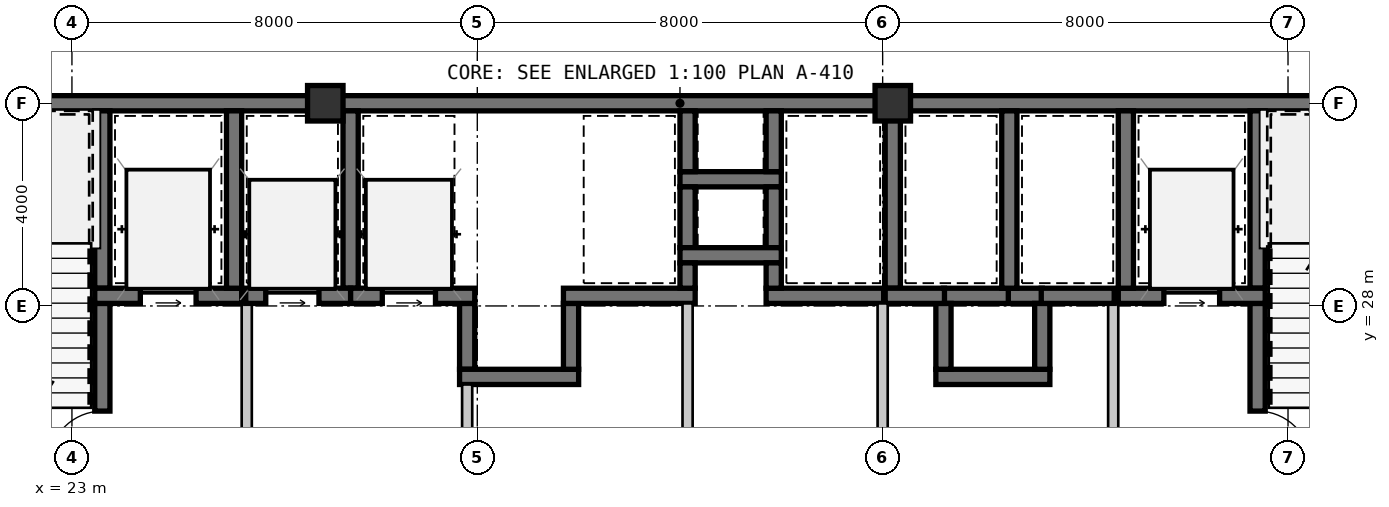
"""IFC4 building model, lengths in metres.
Left out: names, types, materials, properties, quantities, classifications, styles, units other than length and angle.
Written with IfcOpenShell. Run it as: python <this file> out.ifc"""

import sys

from ifc_helpers import new_model, si_unit, direction, frame, frame_2d, origin, origin_2d, place, context, subcontext, project, spatial, rectangle, extrude, source, transform, mapped, element, fill, save


model = new_model("IFC4")
c1 = context("Model", 3, precision=1e-05, world=origin(), true_north=direction((0.0, 1.0)))
c2 = subcontext(c1, "Body", "Model", "MODEL_VIEW")
j1 = project(units=[si_unit("LENGTHUNIT", "METRE"), si_unit("PLANEANGLEUNIT", "RADIAN")], contexts=[c1])
p1 = place(None, origin())
s1 = spatial("IfcSite", under=j1, at=p1, CompositionType="ELEMENT")
p2 = place(p1, origin())
s2 = spatial("IfcBuilding", under=s1, at=p2, CompositionType="ELEMENT")
p3 = place(p2, frame((0.0, 0.0, 93.45)))
s3 = spatial("IfcBuildingStorey", under=s2, at=p3, CompositionType="ELEMENT", Elevation=93.45)
m1 = source(origin(), c2, "Body", "SweptSolid", [
    extrude(rectangle(XDim=0.7, YDim=0.7, at=origin_2d()), origin(), (0.0, 0.0, 1.0), 3.15),
])
for number, where, z_axis, x_axis in (
    (1, (28.0, 32.0, 0.0), (0.0, 0.0, 1.0), (1.0, 0.0, 0.0)),
    (2, (39.2, 32.0, 0.0), (0.0, 0.0, 1.0), (1.0, 0.0, 0.0)),
):
    element("IfcColumn", number, at=place(p3, frame(where, z_axis=z_axis, x_axis=x_axis)), inside=s3, PredefinedType="COLUMN", context=c2, shape_type="MappedRepresentation", body=[
        mapped(m1, transform((0.0, 0.0, 0.0), scale=1.0)),
    ])
m2 = source(origin(), c2, "Body", "SweptSolid", [
    extrude(rectangle(XDim=9.15, YDim=0.3, at=frame_2d((4.575, 0.0))), origin(), (0.0, 0.0, 1.0), 2.93),
])
p4 = place(p3, frame((18.85, 32.0, 0.0), z_axis=(0.0, 0.0, 1.0), x_axis=(1.0, 0.0, 0.0)))
e3 = element("IfcWall", 3, at=p4, inside=s3, PredefinedType="SHEAR", context=c2, shape_type="MappedRepresentation", body=[
    mapped(m2, transform((0.0, 0.0, 0.0), scale=1.0)),
])
m3 = source(origin(), c2, "Body", "SweptSolid", [
    extrude(rectangle(XDim=11.2, YDim=0.3, at=frame_2d((5.6, 0.0))), origin(), (0.0, 0.0, 1.0), 2.93),
])
p5 = place(p3, frame((28.0, 32.0, 0.0), z_axis=(0.0, 0.0, 1.0), x_axis=(1.0, 0.0, 0.0)))
e4 = element("IfcWall", 4, at=p5, inside=s3, PredefinedType="SHEAR", context=c2, shape_type="MappedRepresentation", body=[
    mapped(m3, transform((0.0, 0.0, 0.0), scale=1.0)),
])
m4 = source(origin(), c2, "Body", "SweptSolid", [
    extrude(rectangle(XDim=11.95, YDim=0.3, at=frame_2d((5.975, 0.0))), origin(), (0.0, 0.0, 1.0), 2.93),
])
p6 = place(p3, frame((39.2, 32.0, 0.0), z_axis=(0.0, 0.0, 1.0), x_axis=(1.0, 0.0, 0.0)))
e5 = element("IfcWall", 5, at=p6, inside=s3, PredefinedType="SHEAR", context=c2, shape_type="MappedRepresentation", body=[
    mapped(m4, transform((0.0, 0.0, 0.0), scale=1.0)),
])
m5 = source(origin(), c2, "Body", "SweptSolid", [
    extrude(rectangle(XDim=3.5, YDim=0.3, at=frame_2d((1.75, 0.0))), origin(), (0.0, 0.0, 1.0), 2.93),
])
p7 = place(p3, frame((23.6, 28.35, 0.0), z_axis=(0.0, 0.0, 1.0), x_axis=(0.0, 1.0, 0.0)))
e6 = element("IfcWall", 6, at=p7, inside=s3, PredefinedType="SHEAR", context=c2, shape_type="MappedRepresentation", body=[
    mapped(m5, transform((0.0, 0.0, 0.0), scale=1.0)),
])
m6 = source(origin(), c2, "Body", "SweptSolid", [
    extrude(rectangle(XDim=3.9, YDim=0.3, at=frame_2d((1.95, 0.0))), origin(), (0.0, 0.0, 1.0), 2.93),
])
p8 = place(p3, frame((23.6, 24.15, 0.0), z_axis=(0.0, 0.0, 1.0), x_axis=(0.0, 1.0, 0.0)))
e7 = element("IfcWall", 7, at=p8, inside=s3, PredefinedType="SHEAR", context=c2, shape_type="MappedRepresentation", body=[
    mapped(m6, transform((0.0, 0.0, 0.0), scale=1.0)),
])
m7 = source(origin(), c2, "Body", "SweptSolid", [
    extrude(rectangle(XDim=1.05, YDim=2.1, at=frame_2d((0.525, 1.05))), frame((0.0, 0.16, 0.0), z_axis=(0.0, -1.0, 0.0), x_axis=(1.0, 0.0, 0.0)), (0.0, 0.0, 1.0), 0.32),
])
p9 = place(p8, frame((0.725, 0.0, 0.0)))
e8 = element("IfcOpeningElement", 8, at=p9, cuts=e7, PredefinedType="OPENING", context=c2, shape_type="MappedRepresentation", body=[
    mapped(m7, transform((0.0, 0.0, 0.0), scale=1.0)),
])
m8 = source(origin(), c2, "Body", "SweptSolid", [
    extrude(rectangle(XDim=2.9, YDim=0.3, at=frame_2d((1.45, 0.0))), origin(), (0.0, 0.0, 1.0), 2.93),
])
p10 = place(p3, frame((23.45, 28.2, 0.0), z_axis=(0.0, 0.0, 1.0), x_axis=(1.0, 0.0, 0.0)))
e9 = element("IfcWall", 9, at=p10, inside=s3, PredefinedType="SHEAR", context=c2, shape_type="MappedRepresentation", body=[
    mapped(m8, transform((0.0, 0.0, 0.0), scale=1.0)),
])
m9 = source(origin(), c2, "Body", "SweptSolid", [
    extrude(rectangle(XDim=1.1, YDim=2.15, at=frame_2d((0.55, 1.075))), frame((0.0, 0.16, 0.0), z_axis=(0.0, -1.0, 0.0), x_axis=(1.0, 0.0, 0.0)), (0.0, 0.0, 1.0), 0.32),
])
p11 = place(p10, frame((0.9, 0.0, 0.0)))
e10 = element("IfcOpeningElement", 10, at=p11, cuts=e9, PredefinedType="OPENING", context=c2, shape_type="MappedRepresentation", body=[
    mapped(m9, transform((0.0, 0.0, 0.0), scale=1.0)),
])
p12 = place(p3, frame((26.2, 28.35, 0.0), z_axis=(0.0, 0.0, 1.0), x_axis=(0.0, 1.0, 0.0)))
e11 = element("IfcWall", 11, at=p12, inside=s3, PredefinedType="SHEAR", context=c2, shape_type="MappedRepresentation", body=[
    mapped(m5, transform((0.0, 0.0, 0.0), scale=1.0)),
])
m10 = source(origin(), c2, "Body", "SweptSolid", [
    extrude(rectangle(XDim=3.95, YDim=0.2, at=frame_2d((1.975, 0.0))), origin(), (0.0, 0.0, 1.0), 2.93),
])
p13 = place(p3, frame((26.45, 24.1, 0.0), z_axis=(0.0, 0.0, 1.0), x_axis=(0.0, 1.0, 0.0)))
e12 = element("IfcWall", 12, at=p13, inside=s3, PredefinedType="SOLIDWALL", context=c2, shape_type="MappedRepresentation", body=[
    mapped(m10, transform((0.0, 0.0, 0.0), scale=1.0)),
])
p14 = place(p3, frame((46.4, 31.85, 0.0), z_axis=(0.0, 0.0, 1.0), x_axis=(0.0, -1.0, 0.0)))
e13 = element("IfcWall", 13, at=p14, inside=s3, PredefinedType="SHEAR", context=c2, shape_type="MappedRepresentation", body=[
    mapped(m5, transform((0.0, 0.0, 0.0), scale=1.0)),
])
p15 = place(p3, frame((46.4, 28.05, 0.0), z_axis=(0.0, 0.0, 1.0), x_axis=(0.0, -1.0, 0.0)))
e14 = element("IfcWall", 14, at=p15, inside=s3, PredefinedType="SHEAR", context=c2, shape_type="MappedRepresentation", body=[
    mapped(m6, transform((0.0, 0.0, 0.0), scale=1.0)),
])
p16 = place(p15, frame((2.125, 0.0, 0.0)))
e15 = element("IfcOpeningElement", 15, at=p16, cuts=e14, PredefinedType="OPENING", context=c2, shape_type="MappedRepresentation", body=[
    mapped(m7, transform((0.0, 0.0, 0.0), scale=1.0)),
])
p17 = place(p3, frame((43.65, 28.2, 0.0), z_axis=(0.0, 0.0, 1.0), x_axis=(1.0, 0.0, 0.0)))
e16 = element("IfcWall", 16, at=p17, inside=s3, PredefinedType="SHEAR", context=c2, shape_type="MappedRepresentation", body=[
    mapped(m8, transform((0.0, 0.0, 0.0), scale=1.0)),
])
p18 = place(p17, frame((0.9, 0.0, 0.0)))
e17 = element("IfcOpeningElement", 17, at=p18, cuts=e16, PredefinedType="OPENING", context=c2, shape_type="MappedRepresentation", body=[
    mapped(m9, transform((0.0, 0.0, 0.0), scale=1.0)),
])
p19 = place(p3, frame((43.8, 31.85, 0.0), z_axis=(0.0, 0.0, 1.0), x_axis=(0.0, -1.0, 0.0)))
e18 = element("IfcWall", 18, at=p19, inside=s3, PredefinedType="SHEAR", context=c2, shape_type="MappedRepresentation", body=[
    mapped(m5, transform((0.0, 0.0, 0.0), scale=1.0)),
])
p20 = place(p3, frame((43.55, 28.05, 0.0), z_axis=(0.0, 0.0, 1.0), x_axis=(0.0, -1.0, 0.0)))
e19 = element("IfcWall", 19, at=p20, inside=s3, PredefinedType="SOLIDWALL", context=c2, shape_type="MappedRepresentation", body=[
    mapped(m10, transform((0.0, 0.0, 0.0), scale=1.0)),
])
m11 = source(origin(), c2, "Body", "SweptSolid", [
    extrude(rectangle(XDim=2.0, YDim=0.3, at=frame_2d((1.0, 0.0))), origin(), (0.0, 0.0, 1.0), 2.93),
])
p21 = place(p3, frame((35.0, 30.5, 0.0), z_axis=(0.0, 0.0, 1.0), x_axis=(1.0, 0.0, 0.0)))
e20 = element("IfcWall", 20, at=p21, inside=s3, PredefinedType="SHEAR", context=c2, shape_type="MappedRepresentation", body=[
    mapped(m11, transform((0.0, 0.0, 0.0), scale=1.0)),
])
m12 = source(origin(), c2, "Body", "SweptSolid", [
    extrude(rectangle(XDim=1.2, YDim=0.3, at=frame_2d((0.6, 0.0))), origin(), (0.0, 0.0, 1.0), 2.93),
])
for number, where, z_axis, x_axis in (
    (21, (35.15, 31.85, 0.0), (0.0, 0.0, 1.0), (0.0, -1.0, 0.0)),
    (22, (36.85, 30.65, 0.0), (0.0, 0.0, 1.0), (0.0, 1.0, 0.0)),
    (23, (35.15, 30.35, 0.0), (0.0, 0.0, 1.0), (0.0, -1.0, 0.0)),
    (24, (36.85, 29.15, 0.0), (0.0, 0.0, 1.0), (0.0, 1.0, 0.0)),
):
    element("IfcWall", number, at=place(p3, frame(where, z_axis=z_axis, x_axis=x_axis)), inside=s3, PredefinedType="SHEAR", context=c2, shape_type="MappedRepresentation", body=[
        mapped(m12, transform((0.0, 0.0, 0.0), scale=1.0)),
    ])
p22 = place(p3, frame((35.0, 29.0, 0.0), z_axis=(0.0, 0.0, 1.0), x_axis=(1.0, 0.0, 0.0)))
e25 = element("IfcWall", 25, at=p22, inside=s3, PredefinedType="SHEAR", context=c2, shape_type="MappedRepresentation", body=[
    mapped(m11, transform((0.0, 0.0, 0.0), scale=1.0)),
])
m13 = source(origin(), c2, "Body", "SweptSolid", [
    extrude(rectangle(XDim=1.3, YDim=0.3, at=frame_2d((0.65, 0.0))), origin(), (0.0, 0.0, 1.0), 2.93),
])
p23 = place(p3, frame((30.8, 28.05, 0.0), z_axis=(0.0, 0.0, 1.0), x_axis=(0.0, -1.0, 0.0)))
e26 = element("IfcWall", 26, at=p23, inside=s3, PredefinedType="SHEAR", context=c2, shape_type="MappedRepresentation", body=[
    mapped(m13, transform((0.0, 0.0, 0.0), scale=1.0)),
])
m14 = source(origin(), c2, "Body", "SweptSolid", [
    extrude(rectangle(XDim=2.35, YDim=0.3, at=frame_2d((1.175, 0.0))), origin(), (0.0, 0.0, 1.0), 2.93),
])
p24 = place(p3, frame((30.65, 26.6, 0.0), z_axis=(0.0, 0.0, 1.0), x_axis=(1.0, 0.0, 0.0)))
e27 = element("IfcWall", 27, at=p24, inside=s3, PredefinedType="SHEAR", context=c2, shape_type="MappedRepresentation", body=[
    mapped(m14, transform((0.0, 0.0, 0.0), scale=1.0)),
])
p25 = place(p3, frame((32.85, 26.75, 0.0), z_axis=(0.0, 0.0, 1.0), x_axis=(0.0, 1.0, 0.0)))
e28 = element("IfcWall", 28, at=p25, inside=s3, PredefinedType="SHEAR", context=c2, shape_type="MappedRepresentation", body=[
    mapped(m13, transform((0.0, 0.0, 0.0), scale=1.0)),
])
m15 = source(origin(), c2, "Body", "SweptSolid", [
    extrude(rectangle(XDim=1.32, YDim=0.3, at=frame_2d((0.66, 0.0))), origin(), (0.0, 0.0, 1.0), 2.93),
])
p26 = place(p3, frame((41.52, 28.2, 0.0), z_axis=(0.0, 0.0, 1.0), x_axis=(-1.0, 0.0, 0.0)))
e29 = element("IfcWall", 29, at=p26, inside=s3, PredefinedType="SHEAR", context=c2, shape_type="MappedRepresentation", body=[
    mapped(m15, transform((0.0, 0.0, 0.0), scale=1.0)),
])
m16 = source(origin(), c2, "Body", "SweptSolid", [
    extrude(rectangle(XDim=0.67, YDim=0.3, at=frame_2d((0.335, 0.0))), origin(), (0.0, 0.0, 1.0), 2.93),
])
p27 = place(p3, frame((42.15, 28.2, 0.0), z_axis=(0.0, 0.0, 1.0), x_axis=(-1.0, 0.0, 0.0)))
e30 = element("IfcWall", 30, at=p27, inside=s3, PredefinedType="SHEAR", context=c2, shape_type="MappedRepresentation", body=[
    mapped(m16, transform((0.0, 0.0, 0.0), scale=1.0)),
])
m17 = source(origin(), c2, "Body", "SweptSolid", [
    extrude(rectangle(XDim=2.25, YDim=0.3, at=frame_2d((1.125, 0.0))), origin(), (0.0, 0.0, 1.0), 2.93),
])
p28 = place(p3, frame((40.05, 26.6, 0.0), z_axis=(0.0, 0.0, 1.0), x_axis=(1.0, 0.0, 0.0)))
e31 = element("IfcWall", 31, at=p28, inside=s3, PredefinedType="SHEAR", context=c2, shape_type="MappedRepresentation", body=[
    mapped(m17, transform((0.0, 0.0, 0.0), scale=1.0)),
])
for number, where, z_axis, x_axis in (
    (32, (40.2, 28.05, 0.0), (0.0, 0.0, 1.0), (0.0, -1.0, 0.0)),
    (33, (42.15, 26.75, 0.0), (0.0, 0.0, 1.0), (0.0, 1.0, 0.0)),
):
    element("IfcWall", number, at=place(p3, frame(where, z_axis=z_axis, x_axis=x_axis)), inside=s3, PredefinedType="SHEAR", context=c2, shape_type="MappedRepresentation", body=[
        mapped(m13, transform((0.0, 0.0, 0.0), scale=1.0)),
    ])
p29 = place(p3, frame((28.5, 28.35, 0.0), z_axis=(0.0, 0.0, 1.0), x_axis=(0.0, 1.0, 0.0)))
e34 = element("IfcWall", 34, at=p29, inside=s3, PredefinedType="SHEAR", context=c2, shape_type="MappedRepresentation", body=[
    mapped(m5, transform((0.0, 0.0, 0.0), scale=1.0)),
])
m18 = source(origin(), c2, "Body", "SweptSolid", [
    extrude(rectangle(XDim=2.07, YDim=0.3, at=frame_2d((1.035, 0.0))), origin(), (0.0, 0.0, 1.0), 2.93),
])
p30 = place(p3, frame((26.43, 28.2, 0.0), z_axis=(0.0, 0.0, 1.0), x_axis=(1.0, 0.0, 0.0)))
e35 = element("IfcWall", 35, at=p30, inside=s3, PredefinedType="SHEAR", context=c2, shape_type="MappedRepresentation", body=[
    mapped(m18, transform((0.0, 0.0, 0.0), scale=1.0)),
])
m19 = source(origin(), c2, "Body", "SweptSolid", [
    extrude(rectangle(XDim=1.05, YDim=2.15, at=frame_2d((0.525, 1.075))), frame((0.0, 0.16, 0.0), z_axis=(0.0, -1.0, 0.0), x_axis=(1.0, 0.0, 0.0)), (0.0, 0.0, 1.0), 0.32),
])
p31 = place(p30, frame((0.395, 0.0, 0.0)))
e36 = element("IfcOpeningElement", 36, at=p31, cuts=e35, PredefinedType="OPENING", context=c2, shape_type="MappedRepresentation", body=[
    mapped(m19, transform((0.0, 0.0, 0.0), scale=1.0)),
])
m20 = source(origin(), c2, "Body", "SweptSolid", [
    extrude(rectangle(XDim=2.45, YDim=0.3, at=frame_2d((1.225, 0.0))), origin(), (0.0, 0.0, 1.0), 2.93),
])
p32 = place(p3, frame((28.5, 28.2, 0.0), z_axis=(0.0, 0.0, 1.0), x_axis=(1.0, 0.0, 0.0)))
e37 = element("IfcWall", 37, at=p32, inside=s3, PredefinedType="SHEAR", context=c2, shape_type="MappedRepresentation", body=[
    mapped(m20, transform((0.0, 0.0, 0.0), scale=1.0)),
])
p33 = place(p32, frame((0.625, 0.0, 0.0)))
e38 = element("IfcOpeningElement", 38, at=p33, cuts=e37, PredefinedType="OPENING", context=c2, shape_type="MappedRepresentation", body=[
    mapped(m19, transform((0.0, 0.0, 0.0), scale=1.0)),
])
m21 = source(origin(), c2, "Body", "SweptSolid", [
    extrude(rectangle(XDim=2.35, YDim=0.2, at=frame_2d((1.175, 0.0))), origin(), (0.0, 0.0, 1.0), 2.93),
])
p34 = place(p3, frame((30.8, 26.45, 0.0), z_axis=(0.0, 0.0, 1.0), x_axis=(0.0, -1.0, 0.0)))
e39 = element("IfcWall", 39, at=p34, inside=s3, PredefinedType="SOLIDWALL", context=c2, shape_type="MappedRepresentation", body=[
    mapped(m21, transform((0.0, 0.0, 0.0), scale=1.0)),
])
m22 = source(origin(), c2, "Body", "SweptSolid", [
    extrude(rectangle(XDim=2.6, YDim=0.3, at=frame_2d((1.3, 0.0))), origin(), (0.0, 0.0, 1.0), 2.93),
])
p35 = place(p3, frame((32.7, 28.2, 0.0), z_axis=(0.0, 0.0, 1.0), x_axis=(1.0, 0.0, 0.0)))
e40 = element("IfcWall", 40, at=p35, inside=s3, PredefinedType="SHEAR", context=c2, shape_type="MappedRepresentation", body=[
    mapped(m22, transform((0.0, 0.0, 0.0), scale=1.0)),
])
m23 = source(origin(), c2, "Body", "SweptSolid", [
    extrude(rectangle(XDim=0.5, YDim=0.3, at=frame_2d((0.25, 0.0))), origin(), (0.0, 0.0, 1.0), 2.93),
])
p36 = place(p3, frame((35.15, 28.35, 0.0), z_axis=(0.0, 0.0, 1.0), x_axis=(0.0, 1.0, 0.0)))
e41 = element("IfcWall", 41, at=p36, inside=s3, PredefinedType="SHEAR", context=c2, shape_type="MappedRepresentation", body=[
    mapped(m23, transform((0.0, 0.0, 0.0), scale=1.0)),
])
p37 = place(p3, frame((39.2, 28.35, 0.0), z_axis=(0.0, 0.0, 1.0), x_axis=(0.0, 1.0, 0.0)))
e42 = element("IfcWall", 42, at=p37, inside=s3, PredefinedType="SHEAR", context=c2, shape_type="MappedRepresentation", body=[
    mapped(m5, transform((0.0, 0.0, 0.0), scale=1.0)),
])
m24 = source(origin(), c2, "Body", "SweptSolid", [
    extrude(rectangle(XDim=2.32, YDim=0.3, at=frame_2d((1.16, 0.0))), origin(), (0.0, 0.0, 1.0), 2.93),
])
p38 = place(p3, frame((36.7, 28.2, 0.0), z_axis=(0.0, 0.0, 1.0), x_axis=(1.0, 0.0, 0.0)))
e43 = element("IfcWall", 43, at=p38, inside=s3, PredefinedType="SHEAR", context=c2, shape_type="MappedRepresentation", body=[
    mapped(m24, transform((0.0, 0.0, 0.0), scale=1.0)),
])
p39 = place(p3, frame((36.85, 28.85, 0.0), z_axis=(0.0, 0.0, 1.0), x_axis=(0.0, -1.0, 0.0)))
e44 = element("IfcWall", 44, at=p39, inside=s3, PredefinedType="SHEAR", context=c2, shape_type="MappedRepresentation", body=[
    mapped(m23, transform((0.0, 0.0, 0.0), scale=1.0)),
])
p40 = place(p3, frame((41.5, 28.35, 0.0), z_axis=(0.0, 0.0, 1.0), x_axis=(0.0, 1.0, 0.0)))
e45 = element("IfcWall", 45, at=p40, inside=s3, PredefinedType="SHEAR", context=c2, shape_type="MappedRepresentation", body=[
    mapped(m5, transform((0.0, 0.0, 0.0), scale=1.0)),
])
m25 = source(origin(), c2, "Body", "SweptSolid", [
    extrude(rectangle(XDim=1.17, YDim=0.3, at=frame_2d((0.585, 0.0))), origin(), (0.0, 0.0, 1.0), 2.93),
])
p41 = place(p3, frame((39.05, 28.2, 0.0), z_axis=(0.0, 0.0, 1.0), x_axis=(1.0, 0.0, 0.0)))
e46 = element("IfcWall", 46, at=p41, inside=s3, PredefinedType="SHEAR", context=c2, shape_type="MappedRepresentation", body=[
    mapped(m25, transform((0.0, 0.0, 0.0), scale=1.0)),
])
m26 = source(origin(), c2, "Body", "SweptSolid", [
    extrude(rectangle(XDim=1.44, YDim=0.3, at=frame_2d((0.72, 0.0))), origin(), (0.0, 0.0, 1.0), 2.93),
])
p42 = place(p3, frame((42.13, 28.2, 0.0), z_axis=(0.0, 0.0, 1.0), x_axis=(1.0, 0.0, 0.0)))
e47 = element("IfcWall", 47, at=p42, inside=s3, PredefinedType="SHEAR", context=c2, shape_type="MappedRepresentation", body=[
    mapped(m26, transform((0.0, 0.0, 0.0), scale=1.0)),
])
for number, where, z_axis, x_axis in (
    (48, (35.15, 28.05, 0.0), (0.0, 0.0, 1.0), (0.0, -1.0, 0.0)),
    (49, (39.0, 28.05, 0.0), (0.0, 0.0, 1.0), (0.0, -1.0, 0.0)),
):
    element("IfcWall", number, at=place(p3, frame(where, z_axis=z_axis, x_axis=x_axis)), inside=s3, PredefinedType="SOLIDWALL", context=c2, shape_type="MappedRepresentation", body=[
        mapped(m10, transform((0.0, 0.0, 0.0), scale=1.0)),
    ])
m27 = source(origin(), c2, "Body", "SweptSolid", [
    extrude(rectangle(XDim=1.05, YDim=2.1, at=frame_2d((0.525, 1.05))), frame((0.0, 0.025, 0.0), z_axis=(0.0, -1.0, 0.0), x_axis=(1.0, 0.0, 0.0)), (0.0, 0.0, 1.0), 0.05),
])
p43 = place(p9, origin())
e50 = element("IfcDoor", 50, at=p43, inside=s3, OperationType="SINGLE_SWING_LEFT", PredefinedType="DOOR", context=c2, shape_type="MappedRepresentation", body=[
    mapped(m27, transform((0.0, 0.0, 0.0), scale=1.0)),
])
fill(e8, e50)
m28 = source(origin(), c2, "Body", "SweptSolid", [
    extrude(rectangle(XDim=1.1, YDim=2.15, at=frame_2d((0.55, 1.075))), frame((0.0, 0.025, 0.0), z_axis=(0.0, -1.0, 0.0), x_axis=(1.0, 0.0, 0.0)), (0.0, 0.0, 1.0), 0.05),
])
p44 = place(p11, origin())
e51 = element("IfcDoor", 51, at=p44, inside=s3, OperationType="SLIDING_TO_LEFT", PredefinedType="DOOR", context=c2, shape_type="MappedRepresentation", body=[
    mapped(m28, transform((0.0, 0.0, 0.0), scale=1.0)),
])
fill(e10, e51)
p45 = place(p16, origin())
e52 = element("IfcDoor", 52, at=p45, inside=s3, OperationType="SINGLE_SWING_RIGHT", PredefinedType="DOOR", context=c2, shape_type="MappedRepresentation", body=[
    mapped(m27, transform((0.0, 0.0, 0.0), scale=1.0)),
])
fill(e15, e52)
p46 = place(p18, origin())
e53 = element("IfcDoor", 53, at=p46, inside=s3, OperationType="SLIDING_TO_LEFT", PredefinedType="DOOR", context=c2, shape_type="MappedRepresentation", body=[
    mapped(m28, transform((0.0, 0.0, 0.0), scale=1.0)),
])
fill(e17, e53)
m29 = source(origin(), c2, "Body", "SweptSolid", [
    extrude(rectangle(XDim=1.05, YDim=2.15, at=frame_2d((0.525, 1.075))), frame((0.0, 0.025, 0.0), z_axis=(0.0, -1.0, 0.0), x_axis=(1.0, 0.0, 0.0)), (0.0, 0.0, 1.0), 0.05),
])
p47 = place(p31, origin())
e54 = element("IfcDoor", 54, at=p47, inside=s3, OperationType="SLIDING_TO_LEFT", PredefinedType="DOOR", context=c2, shape_type="MappedRepresentation", body=[
    mapped(m29, transform((0.0, 0.0, 0.0), scale=1.0)),
])
fill(e36, e54)
p48 = place(p33, origin())
e55 = element("IfcDoor", 55, at=p48, inside=s3, OperationType="SLIDING_TO_LEFT", PredefinedType="DOOR", context=c2, shape_type="MappedRepresentation", body=[
    mapped(m29, transform((0.0, 0.0, 0.0), scale=1.0)),
])
fill(e38, e55)
save(model, sys.argv[1])
